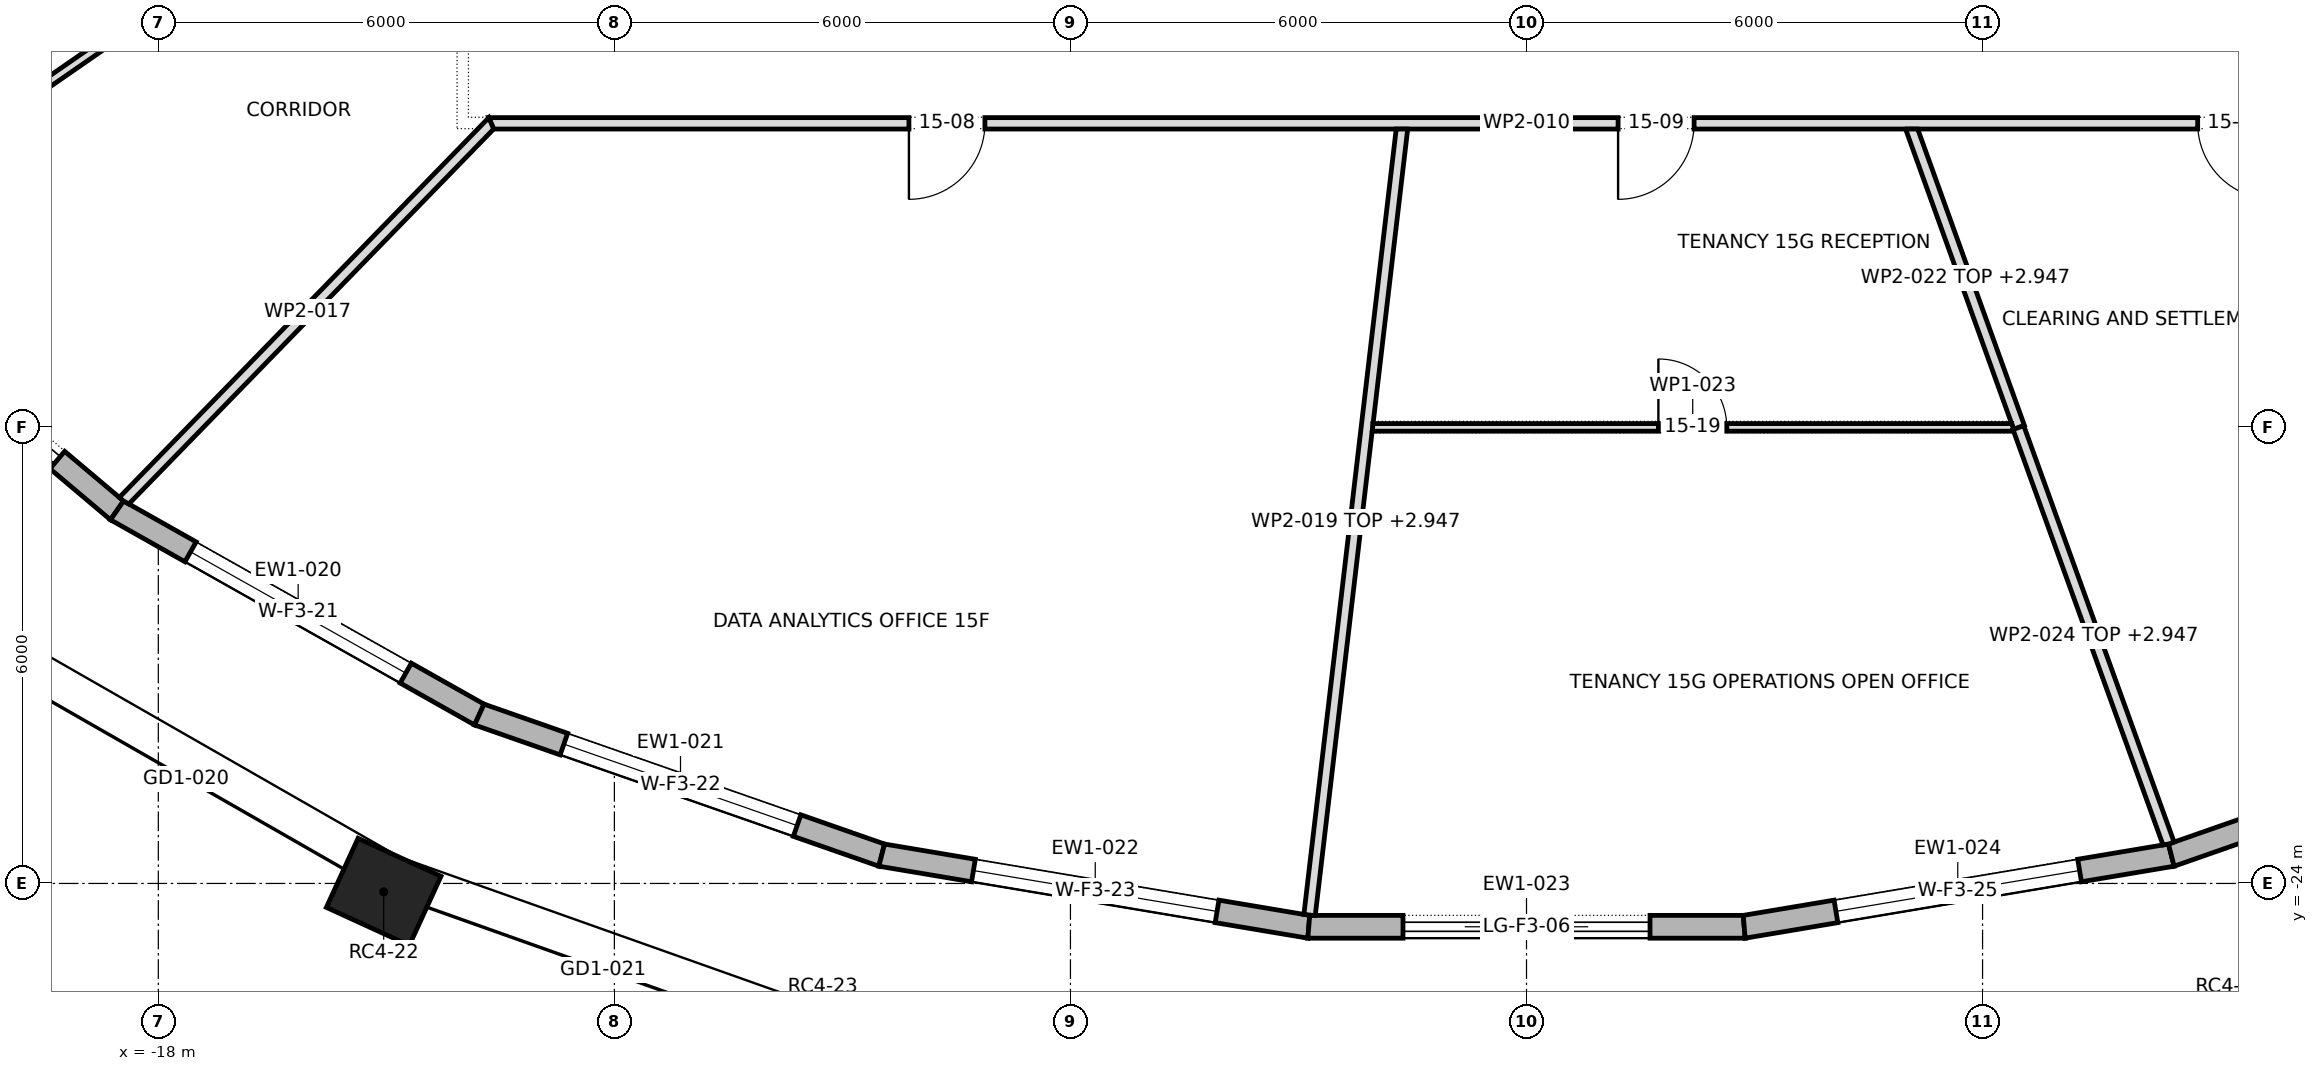
"""IFC4 building model, lengths in metres.
Left out: names, types, materials, properties, quantities, classifications, styles, units other than length and angle.
Written with IfcOpenShell. Run it as: python <this file> out.ifc"""

import sys

from ifc_helpers import new_model, si_unit, direction, frame, frame_2d, origin, origin_2d, place, context, subcontext, project, spatial, polyline, rectangle, outline, extrude, element, fill, save


model = new_model("IFC4")
c1 = context("Model", 3, precision=1e-05, world=origin(), true_north=direction((0.0, 1.0)))
c2 = subcontext(c1, "Body", "Model", "MODEL_VIEW")
j1 = project(units=[si_unit("LENGTHUNIT", "METRE"), si_unit("PLANEANGLEUNIT", "RADIAN")], contexts=[c1])
p1 = place(None, origin())
s1 = spatial("IfcSite", under=j1, at=p1, CompositionType="ELEMENT")
p2 = place(p1, origin())
s2 = spatial("IfcBuilding", under=s1, at=p2, CompositionType="ELEMENT")
p3 = place(p2, frame((0.0, 0.0, 214.9)))
s3 = spatial("IfcBuildingStorey", under=s2, at=p3, CompositionType="ELEMENT", Elevation=214.9)
p4 = place(p3, frame((-15.035, -24.11, 0.0), z_axis=(0.0, 0.0, 1.0), x_axis=(0.909129276708, -0.416514055265, 0.0)))
e1 = element("IfcColumn", 1, at=p4, inside=s3, PredefinedType="COLUMN", context=c2, shape_type="SweptSolid", body=[
    extrude(rectangle(XDim=1.2, YDim=1.0, at=origin_2d()), origin(), (0.0, 0.0, 1.0), 4.0),
])
p5 = place(p3, frame((-22.599, -15.672, 0.0), z_axis=(0.0, 0.0, 1.0), x_axis=(0.764397795062, -0.644744919255, 0.0)))
e2 = element("IfcWall", 2, at=p5, inside=s3, PredefinedType="STANDARD", context=c2, shape_type="SweptSolid", body=[
    extrude(outline(polyline([(-0.015, -0.15), (5.319, -0.15), (5.291, 0.15), (0.015, 0.15), (-0.015, -0.15)])), origin(), (0.0, 0.0, 1.0), 3.7),
])
p6 = place(p5, frame((1.028, 0.0, 0.0)))
e3 = element("IfcOpeningElement", 3, at=p6, cuts=e2, PredefinedType="OPENING", context=c2, shape_type="SweptSolid", body=[
    extrude(rectangle(XDim=3.25, YDim=3.25, at=frame_2d((1.625, 1.625))), frame((0.0, 0.162, 0.0), z_axis=(0.0, -1.0, 0.0), x_axis=(1.0, 0.0, 0.0)), (0.0, 0.0, 1.0), 0.324),
])
p7 = place(p3, frame((-18.543, -19.092, 0.0), z_axis=(0.0, 0.0, 1.0), x_axis=(0.871207038577, -0.490915772749, 0.0)))
e4 = element("IfcWall", 4, at=p7, inside=s3, PredefinedType="STANDARD", context=c2, shape_type="SweptSolid", body=[
    extrude(outline(polyline([(-0.014, -0.15), (5.484, -0.15), (5.458, 0.15), (0.014, 0.15), (-0.014, -0.15)])), origin(), (0.0, 0.0, 1.0), 3.7),
])
p8 = place(p7, frame((1.111, 0.0, 0.6)))
e5 = element("IfcOpeningElement", 5, at=p8, cuts=e4, PredefinedType="OPENING", context=c2, shape_type="SweptSolid", body=[
    extrude(rectangle(XDim=3.25, YDim=2.65, at=frame_2d((1.625, 1.325))), frame((0.0, 0.162, 0.0), z_axis=(0.0, -1.0, 0.0), x_axis=(1.0, 0.0, 0.0)), (0.0, 0.0, 1.0), 0.324),
])
p9 = place(p3, frame((-13.777, -21.778, 0.0), z_axis=(0.0, 0.0, 1.0), x_axis=(0.944053670735, -0.329791853708, 0.0)))
e6 = element("IfcWall", 6, at=p9, inside=s3, PredefinedType="STANDARD", context=c2, shape_type="SweptSolid", body=[
    extrude(outline(polyline([(-0.013, -0.15), (5.62, -0.15), (5.595, 0.15), (0.013, 0.15), (-0.013, -0.15)])), origin(), (0.0, 0.0, 1.0), 3.7),
])
p10 = place(p9, frame((1.179, 0.0, 0.6)))
e7 = element("IfcOpeningElement", 7, at=p10, cuts=e6, PredefinedType="OPENING", context=c2, shape_type="SweptSolid", body=[
    extrude(rectangle(XDim=3.25, YDim=2.65, at=frame_2d((1.625, 1.325))), frame((0.0, 0.162, 0.0), z_axis=(0.0, -1.0, 0.0), x_axis=(1.0, 0.0, 0.0)), (0.0, 0.0, 1.0), 0.324),
])
p11 = place(p3, frame((-8.483, -23.627, 0.0), z_axis=(0.0, 0.0, 1.0), x_axis=(0.986218486863, -0.16544816762, 0.0)))
e8 = element("IfcWall", 8, at=p11, inside=s3, PredefinedType="STANDARD", context=c2, shape_type="SweptSolid", body=[
    extrude(outline(polyline([(-0.013, -0.15), (5.71, -0.15), (5.685, 0.15), (0.013, 0.15), (-0.013, -0.15)])), origin(), (0.0, 0.0, 1.0), 3.7),
])
p12 = place(p11, frame((1.224, 0.0, 0.6)))
e9 = element("IfcOpeningElement", 9, at=p12, cuts=e8, PredefinedType="OPENING", context=c2, shape_type="SweptSolid", body=[
    extrude(rectangle(XDim=3.25, YDim=2.65, at=frame_2d((1.625, 1.325))), frame((0.0, 0.162, 0.0), z_axis=(0.0, -1.0, 0.0), x_axis=(1.0, 0.0, 0.0)), (0.0, 0.0, 1.0), 0.324),
])
p13 = place(p3, frame((-2.864, -24.57, 0.0), z_axis=(0.0, 0.0, 1.0), x_axis=(1.0, 0.0, 0.0)))
e10 = element("IfcWall", 10, at=p13, inside=s3, PredefinedType="STANDARD", context=c2, shape_type="SweptSolid", body=[
    extrude(outline(polyline([(-0.012, -0.15), (5.741, -0.15), (5.716, 0.15), (0.012, 0.15), (-0.012, -0.15)])), origin(), (0.0, 0.0, 1.0), 3.7),
])
p14 = place(p13, frame((1.239, 0.0, 0.0)))
e11 = element("IfcOpeningElement", 11, at=p14, cuts=e10, PredefinedType="OPENING", context=c2, shape_type="SweptSolid", body=[
    extrude(rectangle(XDim=3.25, YDim=3.25, at=frame_2d((1.625, 1.625))), frame((0.0, 0.162, 0.0), z_axis=(0.0, -1.0, 0.0), x_axis=(1.0, 0.0, 0.0)), (0.0, 0.0, 1.0), 0.324),
])
p15 = place(p3, frame((2.864, -24.57, 0.0), z_axis=(0.0, 0.0, 1.0), x_axis=(0.986218486863, 0.16544816762, 0.0)))
e12 = element("IfcWall", 12, at=p15, inside=s3, PredefinedType="STANDARD", context=c2, shape_type="SweptSolid", body=[
    extrude(outline(polyline([(-0.012, -0.15), (5.71, -0.15), (5.685, 0.15), (0.012, 0.15), (-0.012, -0.15)])), origin(), (0.0, 0.0, 1.0), 3.7),
])
p16 = place(p15, frame((1.224, 0.0, 0.6)))
e13 = element("IfcOpeningElement", 13, at=p16, cuts=e12, PredefinedType="OPENING", context=c2, shape_type="SweptSolid", body=[
    extrude(rectangle(XDim=3.25, YDim=2.65, at=frame_2d((1.625, 1.325))), frame((0.0, 0.162, 0.0), z_axis=(0.0, -1.0, 0.0), x_axis=(1.0, 0.0, 0.0)), (0.0, 0.0, 1.0), 0.324),
])
p17 = place(p3, frame((8.483, -23.627, 0.0), z_axis=(0.0, 0.0, 1.0), x_axis=(0.944053670735, 0.329791853708, 0.0)))
e14 = element("IfcWall", 14, at=p17, inside=s3, PredefinedType="STANDARD", context=c2, shape_type="SweptSolid", body=[
    extrude(outline(polyline([(-0.013, -0.15), (5.621, -0.15), (5.594, 0.15), (0.013, 0.15), (-0.013, -0.15)])), origin(), (0.0, 0.0, 1.0), 3.7),
])
p18 = place(p17, frame((1.179, 0.0, 0.6)))
e15 = element("IfcOpeningElement", 15, at=p18, cuts=e14, PredefinedType="OPENING", context=c2, shape_type="SweptSolid", body=[
    extrude(rectangle(XDim=3.25, YDim=2.65, at=frame_2d((1.625, 1.325))), frame((0.0, 0.162, 0.0), z_axis=(0.0, -1.0, 0.0), x_axis=(1.0, 0.0, 0.0)), (0.0, 0.0, 1.0), 0.324),
])
p19 = place(p3, frame((-22.493, -15.569, 0.0), z_axis=(0.0, 0.0, 1.0), x_axis=(0.822322462014, 0.569021764494, 0.0)))
e16 = element("IfcWall", 16, at=p19, inside=s3, PredefinedType="PARTITIONING", context=c2, shape_type="SweptSolid", body=[
    extrude(outline(polyline([(0.02, -0.06), (1.834, -0.06), (3.649, -0.06), (5.464, -0.06), (5.464, 0.06), (3.643, 0.06), (1.821, 0.06), (0.0, 0.06), (0.0, 0.053), (0.003, 0.0), (0.02, -0.06)])), origin(), (0.0, 0.0, 1.0), 3.7),
])
p20 = place(p3, frame((-13.652, -14.0, 0.0), z_axis=(0.0, 0.0, 1.0), x_axis=(1.0, 0.0, 0.0)))
e17 = element("IfcWall", 17, at=p20, inside=s3, PredefinedType="PARTITIONING", context=c2, shape_type="SweptSolid", body=[
    extrude(outline(polyline([(0.063, -0.075), (2.004, -0.075), (3.946, -0.075), (5.887, -0.075), (7.828, -0.075), (9.769, -0.075), (11.71, -0.075), (13.652, -0.075), (15.593, -0.075), (17.534, -0.075), (19.475, -0.075), (21.417, -0.075), (23.358, -0.075), (25.299, -0.075), (27.24, -0.075), (27.303, 0.075), (27.303, 0.075), (25.353, 0.075), (23.403, 0.075), (21.453, 0.075), (19.502, 0.075), (17.552, 0.075), (15.602, 0.075), (13.652, 0.075), (11.701, 0.075), (9.751, 0.075), (7.801, 0.075), (5.851, 0.075), (3.9, 0.075), (1.95, 0.075), (0.0, 0.075), (0.0, 0.075), (0.063, -0.075)])), origin(), (0.0, 0.0, 1.0), 3.7),
])
p21 = place(p20, frame((5.527, 0.0, 0.0)))
e18 = element("IfcOpeningElement", 18, at=p21, cuts=e17, PredefinedType="OPENING", context=c2, shape_type="SweptSolid", body=[
    extrude(rectangle(XDim=1.0, YDim=2.1, at=frame_2d((0.5, 1.05))), frame((0.0, 0.087, 0.0), z_axis=(0.0, -1.0, 0.0), x_axis=(1.0, 0.0, 0.0)), (0.0, 0.0, 1.0), 0.174),
])
p22 = place(p20, frame((14.857, 0.0, 0.0)))
e19 = element("IfcOpeningElement", 19, at=p22, cuts=e17, PredefinedType="OPENING", context=c2, shape_type="SweptSolid", body=[
    extrude(rectangle(XDim=1.0, YDim=2.1, at=frame_2d((0.5, 1.05))), frame((0.0, 0.087, 0.0), z_axis=(0.0, -1.0, 0.0), x_axis=(1.0, 0.0, 0.0)), (0.0, 0.0, 1.0), 0.174),
])
p23 = place(p20, frame((22.482, 0.0, 0.0)))
e20 = element("IfcOpeningElement", 20, at=p23, cuts=e17, PredefinedType="OPENING", context=c2, shape_type="SweptSolid", body=[
    extrude(rectangle(XDim=1.0, YDim=2.1, at=frame_2d((0.5, 1.05))), frame((0.0, 0.087, 0.0), z_axis=(0.0, -1.0, 0.0), x_axis=(1.0, 0.0, 0.0)), (0.0, 0.0, 1.0), 0.174),
])
p24 = place(p3, frame((-13.598, -13.977, 0.0), z_axis=(0.0, 0.0, 1.0), x_axis=(-0.697374409368, -0.716707006494, 0.0)))
e21 = element("IfcWall", 21, at=p24, inside=s3, PredefinedType="PARTITIONING", context=c2, shape_type="SweptSolid", body=[
    extrude(outline(polyline([(6.971, -0.075), (6.971, -0.07), (6.966, -0.002), (6.946, 0.075), (5.225, 0.075), (3.505, 0.075), (1.784, 0.075), (0.063, 0.075), (0.032, 0.0), (0.0, -0.075), (1.743, -0.075), (3.486, -0.075), (5.228, -0.075), (6.971, -0.075)])), origin(), (0.0, 0.0, 1.0), 3.7),
])
p25 = place(p3, frame((-2.854, -24.416, 0.0), z_axis=(0.0, 0.0, 1.0), x_axis=(0.116750167138, 0.993161315433, 0.0)))
e22 = element("IfcWall", 22, at=p25, inside=s3, PredefinedType="PARTITIONING", context=c2, shape_type="SweptSolid", body=[
    extrude(outline(polyline([(0.004, -0.075), (1.63, -0.075), (3.256, -0.075), (4.882, -0.075), (6.508, -0.075), (6.519, -0.074), (6.519, -0.075), (8.469, -0.075), (10.42, -0.075), (10.42, -0.072), (10.403, 0.075), (8.669, 0.075), (6.935, 0.075), (5.201, 0.075), (3.468, 0.075), (1.734, 0.075), (0.0, 0.075), (0.0, -0.039), (0.004, -0.075)])), origin(), (0.0, 0.0, 1.0), 2.947),
])
p26 = place(p3, frame((5.058, -14.05, 0.0), z_axis=(0.0, 0.0, 1.0), x_axis=(0.338678283686, -0.940902237302, 0.0)))
e23 = element("IfcWall", 23, at=p26, inside=s3, PredefinedType="PARTITIONING", context=c2, shape_type="SweptSolid", body=[
    extrude(outline(polyline([(0.0, -0.075), (1.373, -0.075), (2.745, -0.075), (4.118, -0.075), (4.118, -0.075), (4.119, -0.075), (4.198, -0.075), (4.198, 0.075), (2.817, 0.075), (1.435, 0.075), (0.054, 0.075), (0.0, -0.074), (0.0, -0.075)])), origin(), (0.0, 0.0, 1.0), 2.947),
])
p27 = place(p3, frame((6.408, -18.0, 0.0), z_axis=(0.0, 0.0, 1.0), x_axis=(-1.0, 0.0, 0.0)))
e24 = element("IfcWall", 24, at=p27, inside=s3, PredefinedType="PARTITIONING", context=c2, shape_type="SweptSolid", body=[
    extrude(outline(polyline([(0.026, -0.05), (1.706, -0.05), (3.386, -0.05), (5.066, -0.05), (6.746, -0.05), (8.427, -0.05), (8.438, 0.047), (8.438, 0.05), (6.75, 0.05), (5.063, 0.05), (3.375, 0.05), (1.688, 0.05), (0.0, 0.05), (0.0, 0.049), (0.007, 0.03), (0.0, 0.028), (0.0, 0.021), (0.026, -0.05)])), origin(), (0.0, 0.0, 1.0), 3.7),
])
p28 = place(p27, frame((3.773, 0.0, 0.0)))
e25 = element("IfcOpeningElement", 25, at=p28, cuts=e24, PredefinedType="OPENING", context=c2, shape_type="SweptSolid", body=[
    extrude(rectangle(XDim=0.9, YDim=2.1, at=frame_2d((0.45, 1.05))), frame((0.0, 0.062, 0.0), z_axis=(0.0, -1.0, 0.0), x_axis=(1.0, 0.0, 0.0)), (0.0, 0.0, 1.0), 0.124),
])
p29 = place(p3, frame((6.471, -18.003, 0.0), z_axis=(0.0, 0.0, 1.0), x_axis=(0.339648584393, -0.940552411681, 0.0)))
e26 = element("IfcWall", 26, at=p29, inside=s3, PredefinedType="PARTITIONING", context=c2, shape_type="SweptSolid", body=[
    extrude(outline(polyline([(0.021, -0.075), (1.951, -0.075), (3.881, -0.075), (5.81, -0.075), (5.823, -0.004), (5.824, 0.043), (5.824, 0.075), (3.883, 0.075), (1.941, 0.075), (0.0, 0.075), (0.0, -0.067), (0.021, -0.075)])), origin(), (0.0, 0.0, 1.0), 2.947),
])
p30 = place(p6, origin())
e27 = element("IfcDoor", 27, at=p30, inside=s3, OperationType="DOUBLE_DOOR_SLIDING", PredefinedType="DOOR", context=c2, shape_type="SweptSolid", body=[
    extrude(rectangle(XDim=3.25, YDim=3.25, at=frame_2d((1.625, 1.625))), frame((0.0, 0.025, 0.0), z_axis=(0.0, -1.0, 0.0), x_axis=(1.0, 0.0, 0.0)), (0.0, 0.0, 1.0), 0.05),
])
fill(e3, e27)
p31 = place(p8, origin())
e28 = element("IfcWindow", 28, at=p31, inside=s3, PartitioningType="TRIPLE_PANEL_VERTICAL", PredefinedType="WINDOW", context=c2, shape_type="SweptSolid", body=[
    extrude(rectangle(XDim=3.25, YDim=2.65, at=frame_2d((1.625, 1.325))), frame((0.0, 0.03, 0.0), z_axis=(0.0, -1.0, 0.0), x_axis=(1.0, 0.0, 0.0)), (0.0, 0.0, 1.0), 0.06),
])
fill(e5, e28)
p32 = place(p10, origin())
e29 = element("IfcWindow", 29, at=p32, inside=s3, PartitioningType="TRIPLE_PANEL_VERTICAL", PredefinedType="WINDOW", context=c2, shape_type="SweptSolid", body=[
    extrude(rectangle(XDim=3.25, YDim=2.65, at=frame_2d((1.625, 1.325))), frame((0.0, 0.03, 0.0), z_axis=(0.0, -1.0, 0.0), x_axis=(1.0, 0.0, 0.0)), (0.0, 0.0, 1.0), 0.06),
])
fill(e7, e29)
p33 = place(p12, origin())
e30 = element("IfcWindow", 30, at=p33, inside=s3, PartitioningType="TRIPLE_PANEL_VERTICAL", PredefinedType="WINDOW", context=c2, shape_type="SweptSolid", body=[
    extrude(rectangle(XDim=3.25, YDim=2.65, at=frame_2d((1.625, 1.325))), frame((0.0, 0.03, 0.0), z_axis=(0.0, -1.0, 0.0), x_axis=(1.0, 0.0, 0.0)), (0.0, 0.0, 1.0), 0.06),
])
fill(e9, e30)
p34 = place(p14, origin())
e31 = element("IfcDoor", 31, at=p34, inside=s3, OperationType="DOUBLE_DOOR_SLIDING", PredefinedType="DOOR", context=c2, shape_type="SweptSolid", body=[
    extrude(rectangle(XDim=3.25, YDim=3.25, at=frame_2d((1.625, 1.625))), frame((0.0, 0.025, 0.0), z_axis=(0.0, -1.0, 0.0), x_axis=(1.0, 0.0, 0.0)), (0.0, 0.0, 1.0), 0.05),
])
fill(e11, e31)
p35 = place(p16, origin())
e32 = element("IfcWindow", 32, at=p35, inside=s3, PartitioningType="TRIPLE_PANEL_VERTICAL", PredefinedType="WINDOW", context=c2, shape_type="SweptSolid", body=[
    extrude(rectangle(XDim=3.25, YDim=2.65, at=frame_2d((1.625, 1.325))), frame((0.0, 0.03, 0.0), z_axis=(0.0, -1.0, 0.0), x_axis=(1.0, 0.0, 0.0)), (0.0, 0.0, 1.0), 0.06),
])
fill(e13, e32)
p36 = place(p21, frame((1.0, 0.0, 0.0), z_axis=(0.0, 0.0, 1.0), x_axis=(-1.0, 0.0, 0.0)))
e33 = element("IfcDoor", 33, at=p36, inside=s3, OperationType="SINGLE_SWING_LEFT", PredefinedType="DOOR", context=c2, shape_type="SweptSolid", body=[
    extrude(rectangle(XDim=1.0, YDim=2.1, at=frame_2d((0.5, 1.05))), frame((0.0, 0.025, 0.0), z_axis=(0.0, -1.0, 0.0), x_axis=(1.0, 0.0, 0.0)), (0.0, 0.0, 1.0), 0.05),
])
fill(e18, e33)
p37 = place(p22, frame((1.0, 0.0, 0.0), z_axis=(0.0, 0.0, 1.0), x_axis=(-1.0, 0.0, 0.0)))
e34 = element("IfcDoor", 34, at=p37, inside=s3, OperationType="SINGLE_SWING_LEFT", PredefinedType="DOOR", context=c2, shape_type="SweptSolid", body=[
    extrude(rectangle(XDim=1.0, YDim=2.1, at=frame_2d((0.5, 1.05))), frame((0.0, 0.025, 0.0), z_axis=(0.0, -1.0, 0.0), x_axis=(1.0, 0.0, 0.0)), (0.0, 0.0, 1.0), 0.05),
])
fill(e19, e34)
p38 = place(p23, frame((1.0, 0.0, 0.0), z_axis=(0.0, 0.0, 1.0), x_axis=(-1.0, 0.0, 0.0)))
e35 = element("IfcDoor", 35, at=p38, inside=s3, OperationType="SINGLE_SWING_RIGHT", PredefinedType="DOOR", context=c2, shape_type="SweptSolid", body=[
    extrude(rectangle(XDim=1.0, YDim=2.1, at=frame_2d((0.5, 1.05))), frame((0.0, 0.025, 0.0), z_axis=(0.0, -1.0, 0.0), x_axis=(1.0, 0.0, 0.0)), (0.0, 0.0, 1.0), 0.05),
])
fill(e20, e35)
p39 = place(p28, frame((0.9, 0.0, 0.0), z_axis=(0.0, 0.0, 1.0), x_axis=(-1.0, 0.0, 0.0)))
e36 = element("IfcDoor", 36, at=p39, inside=s3, OperationType="SINGLE_SWING_RIGHT", PredefinedType="DOOR", context=c2, shape_type="SweptSolid", body=[
    extrude(rectangle(XDim=0.9, YDim=2.1, at=frame_2d((0.45, 1.05))), frame((0.0, 0.025, 0.0), z_axis=(0.0, -1.0, 0.0), x_axis=(1.0, 0.0, 0.0)), (0.0, 0.0, 1.0), 0.05),
])
fill(e25, e36)
save(model, sys.argv[1])
